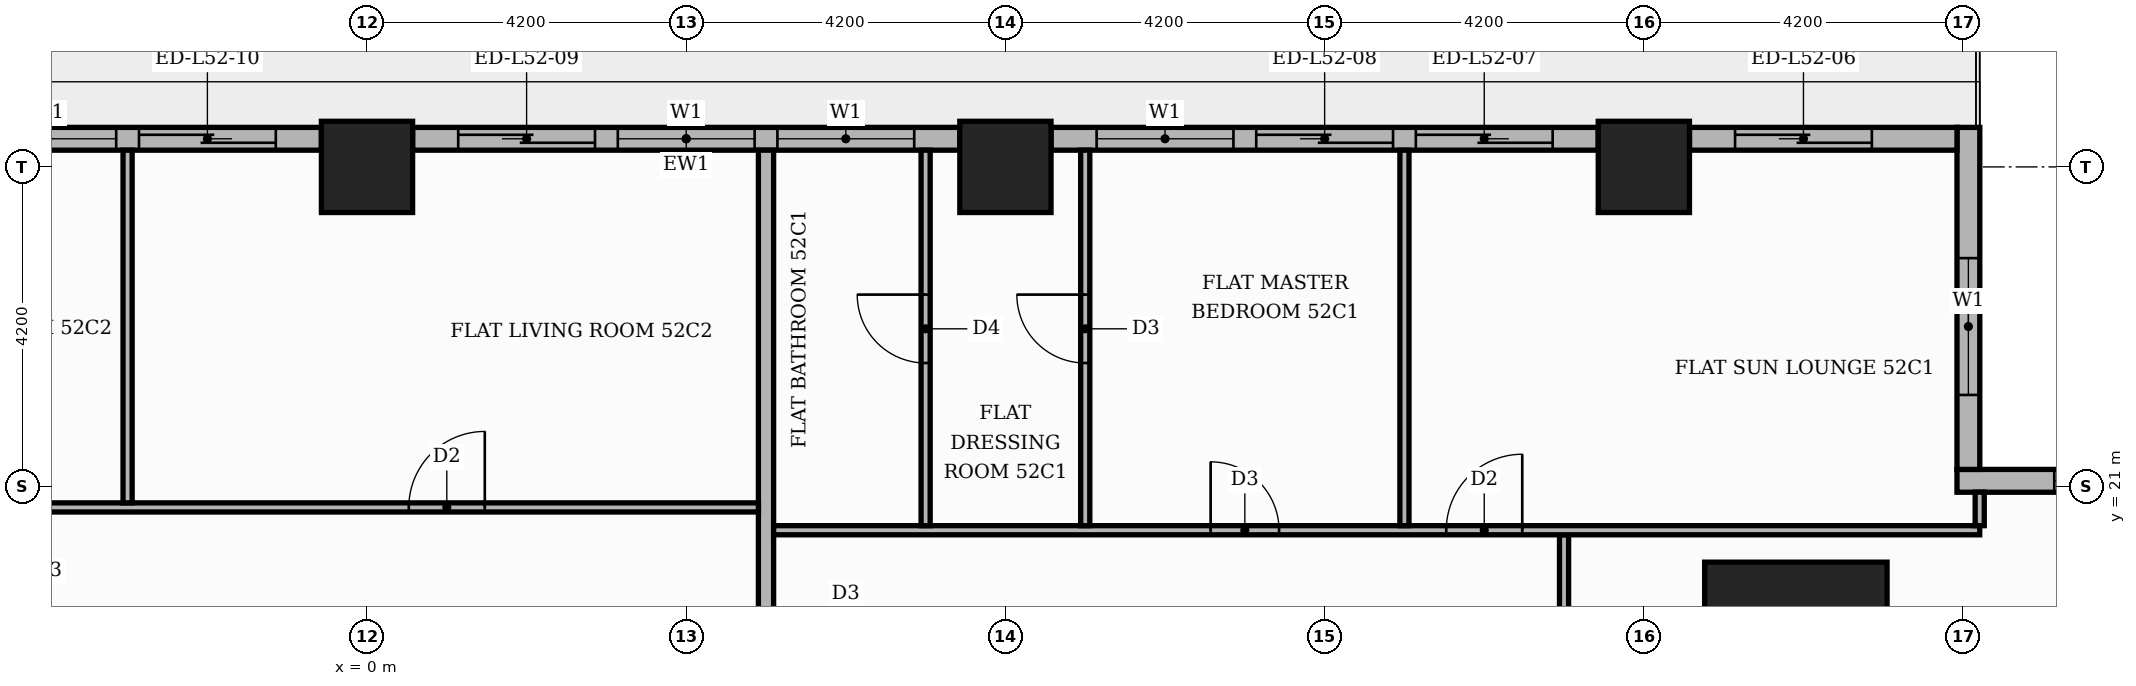
"""IFC4 building model, lengths in metres.
Left out: names, types, materials, properties, quantities, classifications, styles, units other than length and angle.
Written with IfcOpenShell. Run it as: python <this file> out.ifc"""

import sys

from ifc_helpers import new_model, si_unit, direction, frame, frame_2d, origin, origin_2d, place, context, subcontext, project, spatial, rectangle, extrude, element, fill, save


model = new_model("IFC4")
c1 = context("Model", 3, precision=1e-05, world=origin(), true_north=direction((0.0, 1.0)))
c2 = subcontext(c1, "Body", "Model", "MODEL_VIEW")
j1 = project(units=[si_unit("LENGTHUNIT", "METRE"), si_unit("PLANEANGLEUNIT", "RADIAN")], contexts=[c1])
p1 = place(None, origin())
s1 = spatial("IfcSite", under=j1, at=p1, CompositionType="ELEMENT")
p2 = place(p1, origin())
s2 = spatial("IfcBuilding", under=s1, at=p2, CompositionType="ELEMENT")
p3 = place(p2, frame((0.0, 0.0, 219.6)))
s3 = spatial("IfcBuildingStorey", under=s2, at=p3, CompositionType="ELEMENT", Elevation=219.6)
p4 = place(p3, frame((18.8, 18.8, 0.0), z_axis=(0.0, 0.0, 1.0), x_axis=(1.0, 0.0, 0.0)))
e1 = element("IfcColumn", 1, at=p4, inside=s3, PredefinedType="COLUMN", context=c2, shape_type="SweptSolid", body=[
    extrude(rectangle(XDim=2.4, YDim=2.4, at=origin_2d()), origin(), (0.0, 0.0, 1.0), 3.9),
])
for number, where, z_axis, x_axis in (
    (2, (0.0, 25.2, 0.0), (0.0, 0.0, 1.0), (1.0, 0.0, 0.0)),
    (3, (8.4, 25.2, 0.0), (0.0, 0.0, 1.0), (1.0, 0.0, 0.0)),
    (4, (16.8, 25.2, 0.0), (0.0, 0.0, 1.0), (1.0, 0.0, 0.0)),
):
    element("IfcColumn", number, at=place(p3, frame(where, z_axis=z_axis, x_axis=x_axis)), inside=s3, PredefinedType="COLUMN", context=c2, shape_type="SweptSolid", body=[
        extrude(rectangle(XDim=1.2, YDim=1.2, at=origin_2d()), origin(), (0.0, 0.0, 1.0), 3.9),
    ])
p5 = place(p3, frame((25.42, 21.07, 0.0), z_axis=(0.0, 0.0, 1.0), x_axis=(-1.0, 0.0, 0.0)))
e5 = element("IfcWall", 5, at=p5, inside=s3, PredefinedType="STANDARD", context=c2, shape_type="SweptSolid", body=[
    extrude(rectangle(XDim=4.5, YDim=0.3, at=frame_2d((2.25, 0.0))), origin(), (0.0, 0.0, 1.0), 3.48),
])
p6 = place(p5, frame((1.42, 0.0, 0.9)))
e6 = element("IfcOpeningElement", 6, at=p6, cuts=e5, PredefinedType="OPENING", context=c2, shape_type="SweptSolid", body=[
    extrude(rectangle(XDim=1.8, YDim=2.1, at=frame_2d((0.9, 1.05))), frame((0.0, 0.16, 0.0), z_axis=(0.0, -1.0, 0.0), x_axis=(1.0, 0.0, 0.0)), (0.0, 0.0, 1.0), 0.32),
])
p7 = place(p3, frame((21.07, 21.22, 0.0), z_axis=(0.0, 0.0, 1.0), x_axis=(0.0, 1.0, 0.0)))
e7 = element("IfcWall", 7, at=p7, inside=s3, PredefinedType="STANDARD", context=c2, shape_type="SweptSolid", body=[
    extrude(rectangle(XDim=4.5, YDim=0.3, at=frame_2d((2.25, 0.0))), origin(), (0.0, 0.0, 1.0), 3.48),
])
p8 = place(p7, frame((0.98, 0.0, 0.9)))
e8 = element("IfcOpeningElement", 8, at=p8, cuts=e7, PredefinedType="OPENING", context=c2, shape_type="SweptSolid", body=[
    extrude(rectangle(XDim=1.8, YDim=2.1, at=frame_2d((0.9, 1.05))), frame((0.0, 0.16, 0.0), z_axis=(0.0, -1.0, 0.0), x_axis=(1.0, 0.0, 0.0)), (0.0, 0.0, 1.0), 0.32),
])
p9 = place(p3, frame((20.92, 25.57, 0.0), z_axis=(0.0, 0.0, 1.0), x_axis=(-1.0, 0.0, 0.0)))
e9 = element("IfcWall", 9, at=p9, inside=s3, PredefinedType="STANDARD", context=c2, shape_type="SweptSolid", body=[
    extrude(rectangle(XDim=3.52, YDim=0.3, at=frame_2d((1.76, 0.0))), origin(), (0.0, 0.0, 1.0), 3.48),
])
p10 = place(p9, frame((1.12, 0.0, 0.0)))
e10 = element("IfcOpeningElement", 10, at=p10, cuts=e9, PredefinedType="OPENING", context=c2, shape_type="SweptSolid", body=[
    extrude(rectangle(XDim=1.8, YDim=2.4, at=frame_2d((0.9, 1.2))), frame((0.0, 0.16, 0.0), z_axis=(0.0, -1.0, 0.0), x_axis=(1.0, 0.0, 0.0)), (0.0, 0.0, 1.0), 0.32),
])
p11 = place(p3, frame((16.2, 25.57, 0.0), z_axis=(0.0, 0.0, 1.0), x_axis=(-1.0, 0.0, 0.0)))
e11 = element("IfcWall", 11, at=p11, inside=s3, PredefinedType="STANDARD", context=c2, shape_type="SweptSolid", body=[
    extrude(rectangle(XDim=7.2, YDim=0.3, at=frame_2d((3.6, 0.0))), origin(), (0.0, 0.0, 1.0), 3.48),
])
p12 = place(p11, frame((0.6, 0.0, 0.0)))
e12 = element("IfcOpeningElement", 12, at=p12, cuts=e11, PredefinedType="OPENING", context=c2, shape_type="SweptSolid", body=[
    extrude(rectangle(XDim=1.8, YDim=2.4, at=frame_2d((0.9, 1.2))), frame((0.0, 0.16, 0.0), z_axis=(0.0, -1.0, 0.0), x_axis=(1.0, 0.0, 0.0)), (0.0, 0.0, 1.0), 0.32),
])
p13 = place(p11, frame((2.7, 0.0, 0.0)))
e13 = element("IfcOpeningElement", 13, at=p13, cuts=e11, PredefinedType="OPENING", context=c2, shape_type="SweptSolid", body=[
    extrude(rectangle(XDim=1.8, YDim=2.4, at=frame_2d((0.9, 1.2))), frame((0.0, 0.16, 0.0), z_axis=(0.0, -1.0, 0.0), x_axis=(1.0, 0.0, 0.0)), (0.0, 0.0, 1.0), 0.32),
])
p14 = place(p11, frame((4.8, 0.0, 0.9)))
e14 = element("IfcOpeningElement", 14, at=p14, cuts=e11, PredefinedType="OPENING", context=c2, shape_type="SweptSolid", body=[
    extrude(rectangle(XDim=1.8, YDim=2.1, at=frame_2d((0.9, 1.05))), frame((0.0, 0.16, 0.0), z_axis=(0.0, -1.0, 0.0), x_axis=(1.0, 0.0, 0.0)), (0.0, 0.0, 1.0), 0.32),
])
p15 = place(p3, frame((7.8, 25.57, 0.0), z_axis=(0.0, 0.0, 1.0), x_axis=(-1.0, 0.0, 0.0)))
e15 = element("IfcWall", 15, at=p15, inside=s3, PredefinedType="STANDARD", context=c2, shape_type="SweptSolid", body=[
    extrude(rectangle(XDim=7.2, YDim=0.3, at=frame_2d((3.6, 0.0))), origin(), (0.0, 0.0, 1.0), 3.48),
])
p16 = place(p15, frame((0.6, 0.0, 0.9)))
e16 = element("IfcOpeningElement", 16, at=p16, cuts=e15, PredefinedType="OPENING", context=c2, shape_type="SweptSolid", body=[
    extrude(rectangle(XDim=1.8, YDim=2.1, at=frame_2d((0.9, 1.05))), frame((0.0, 0.16, 0.0), z_axis=(0.0, -1.0, 0.0), x_axis=(1.0, 0.0, 0.0)), (0.0, 0.0, 1.0), 0.32),
])
p17 = place(p15, frame((2.7, 0.0, 0.9)))
e17 = element("IfcOpeningElement", 17, at=p17, cuts=e15, PredefinedType="OPENING", context=c2, shape_type="SweptSolid", body=[
    extrude(rectangle(XDim=1.8, YDim=2.1, at=frame_2d((0.9, 1.05))), frame((0.0, 0.16, 0.0), z_axis=(0.0, -1.0, 0.0), x_axis=(1.0, 0.0, 0.0)), (0.0, 0.0, 1.0), 0.32),
])
p18 = place(p15, frame((4.8, 0.0, 0.0)))
e18 = element("IfcOpeningElement", 18, at=p18, cuts=e15, PredefinedType="OPENING", context=c2, shape_type="SweptSolid", body=[
    extrude(rectangle(XDim=1.8, YDim=2.4, at=frame_2d((0.9, 1.2))), frame((0.0, 0.16, 0.0), z_axis=(0.0, -1.0, 0.0), x_axis=(1.0, 0.0, 0.0)), (0.0, 0.0, 1.0), 0.32),
])
p19 = place(p3, frame((-0.6, 25.57, 0.0), z_axis=(0.0, 0.0, 1.0), x_axis=(-1.0, 0.0, 0.0)))
e19 = element("IfcWall", 19, at=p19, inside=s3, PredefinedType="STANDARD", context=c2, shape_type="SweptSolid", body=[
    extrude(rectangle(XDim=7.2, YDim=0.3, at=frame_2d((3.6, 0.0))), origin(), (0.0, 0.0, 1.0), 3.48),
])
p20 = place(p19, frame((0.6, 0.0, 0.0)))
e20 = element("IfcOpeningElement", 20, at=p20, cuts=e19, PredefinedType="OPENING", context=c2, shape_type="SweptSolid", body=[
    extrude(rectangle(XDim=1.8, YDim=2.4, at=frame_2d((0.9, 1.2))), frame((0.0, 0.16, 0.0), z_axis=(0.0, -1.0, 0.0), x_axis=(1.0, 0.0, 0.0)), (0.0, 0.0, 1.0), 0.32),
])
p21 = place(p19, frame((2.7, 0.0, 0.9)))
e21 = element("IfcOpeningElement", 21, at=p21, cuts=e19, PredefinedType="OPENING", context=c2, shape_type="SweptSolid", body=[
    extrude(rectangle(XDim=1.8, YDim=2.1, at=frame_2d((0.9, 1.05))), frame((0.0, 0.16, 0.0), z_axis=(0.0, -1.0, 0.0), x_axis=(1.0, 0.0, 0.0)), (0.0, 0.0, 1.0), 0.32),
])
p22 = place(p19, frame((4.8, 0.0, 0.0)))
e22 = element("IfcOpeningElement", 22, at=p22, cuts=e19, PredefinedType="OPENING", context=c2, shape_type="SweptSolid", body=[
    extrude(rectangle(XDim=1.8, YDim=2.4, at=frame_2d((0.9, 1.2))), frame((0.0, 0.16, 0.0), z_axis=(0.0, -1.0, 0.0), x_axis=(1.0, 0.0, 0.0)), (0.0, 0.0, 1.0), 0.32),
])
p23 = place(p3, frame((5.25, 13.75, 0.0), z_axis=(0.0, 0.0, 1.0), x_axis=(0.0, 1.0, 0.0)))
e23 = element("IfcWall", 23, at=p23, inside=s3, PredefinedType="PARTITIONING", context=c2, shape_type="SweptSolid", body=[
    extrude(rectangle(XDim=11.67, YDim=0.2, at=frame_2d((5.835, 0.0))), origin(), (0.0, 0.0, 1.0), 3.48),
])
p24 = place(p3, frame((15.75, 13.75, 0.0), z_axis=(0.0, 0.0, 1.0), x_axis=(0.0, 1.0, 0.0)))
e24 = element("IfcWall", 24, at=p24, inside=s3, PredefinedType="PARTITIONING", context=c2, shape_type="SweptSolid", body=[
    extrude(rectangle(XDim=6.61, YDim=0.12, at=frame_2d((3.305, 0.0))), origin(), (0.0, 0.0, 1.0), 3.48),
])
p25 = place(p24, frame((2.785, 0.0, 0.0)))
e25 = element("IfcOpeningElement", 25, at=p25, cuts=e24, PredefinedType="OPENING", context=c2, shape_type="SweptSolid", body=[
    extrude(rectangle(XDim=1.0, YDim=2.1, at=frame_2d((0.5, 1.05))), frame((0.0, 0.07, 0.0), z_axis=(0.0, -1.0, 0.0), x_axis=(1.0, 0.0, 0.0)), (0.0, 0.0, 1.0), 0.14),
])
p26 = place(p3, frame((5.35, 20.42, 0.0), z_axis=(0.0, 0.0, 1.0), x_axis=(1.0, 0.0, 0.0)))
e26 = element("IfcWall", 26, at=p26, inside=s3, PredefinedType="PARTITIONING", context=c2, shape_type="SweptSolid", body=[
    extrude(rectangle(XDim=15.869, YDim=0.12, at=frame_2d((7.935, 0.0))), origin(), (0.0, 0.0, 1.0), 3.48),
])
p27 = place(p26, frame((8.85, 0.0, 0.0)))
e27 = element("IfcOpeningElement", 27, at=p27, cuts=e26, PredefinedType="OPENING", context=c2, shape_type="SweptSolid", body=[
    extrude(rectangle(XDim=1.0, YDim=2.1, at=frame_2d((0.5, 1.05))), frame((0.0, 0.07, 0.0), z_axis=(0.0, -1.0, 0.0), x_axis=(1.0, 0.0, 0.0)), (0.0, 0.0, 1.0), 0.14),
])
p28 = place(p26, frame((5.75, 0.0, 0.0)))
e28 = element("IfcOpeningElement", 28, at=p28, cuts=e26, PredefinedType="OPENING", context=c2, shape_type="SweptSolid", body=[
    extrude(rectangle(XDim=0.9, YDim=2.1, at=frame_2d((0.45, 1.05))), frame((0.0, 0.07, 0.0), z_axis=(0.0, -1.0, 0.0), x_axis=(1.0, 0.0, 0.0)), (0.0, 0.0, 1.0), 0.14),
])
p29 = place(p3, frame((7.35, 20.48, 0.0), z_axis=(0.0, 0.0, 1.0), x_axis=(0.0, 1.0, 0.0)))
e29 = element("IfcWall", 29, at=p29, inside=s3, PredefinedType="PARTITIONING", context=c2, shape_type="SweptSolid", body=[
    extrude(rectangle(XDim=4.94, YDim=0.12, at=frame_2d((2.47, 0.0))), origin(), (0.0, 0.0, 1.0), 3.48),
])
p30 = place(p29, frame((2.14, 0.0, 0.0)))
e30 = element("IfcOpeningElement", 30, at=p30, cuts=e29, PredefinedType="OPENING", context=c2, shape_type="SweptSolid", body=[
    extrude(rectangle(XDim=0.9, YDim=2.1, at=frame_2d((0.45, 1.05))), frame((0.0, 0.07, 0.0), z_axis=(0.0, -1.0, 0.0), x_axis=(1.0, 0.0, 0.0)), (0.0, 0.0, 1.0), 0.14),
])
p31 = place(p3, frame((9.45, 20.48, 0.0), z_axis=(0.0, 0.0, 1.0), x_axis=(0.0, 1.0, 0.0)))
e31 = element("IfcWall", 31, at=p31, inside=s3, PredefinedType="PARTITIONING", context=c2, shape_type="SweptSolid", body=[
    extrude(rectangle(XDim=4.94, YDim=0.12, at=frame_2d((2.47, 0.0))), origin(), (0.0, 0.0, 1.0), 3.48),
])
p32 = place(p31, frame((2.14, 0.0, 0.0)))
e32 = element("IfcOpeningElement", 32, at=p32, cuts=e31, PredefinedType="OPENING", context=c2, shape_type="SweptSolid", body=[
    extrude(rectangle(XDim=0.9, YDim=2.1, at=frame_2d((0.45, 1.05))), frame((0.0, 0.07, 0.0), z_axis=(0.0, -1.0, 0.0), x_axis=(1.0, 0.0, 0.0)), (0.0, 0.0, 1.0), 0.14),
])
p33 = place(p3, frame((13.65, 20.48, 0.0), z_axis=(0.0, 0.0, 1.0), x_axis=(0.0, 1.0, 0.0)))
e33 = element("IfcWall", 33, at=p33, inside=s3, PredefinedType="PARTITIONING", context=c2, shape_type="SweptSolid", body=[
    extrude(rectangle(XDim=4.94, YDim=0.12, at=frame_2d((2.47, 0.0))), origin(), (0.0, 0.0, 1.0), 3.48),
])
p34 = place(p3, frame((21.219, 20.48, 0.0), z_axis=(0.0, 0.0, 1.0), x_axis=(0.0, 1.0, 0.0)))
e34 = element("IfcWall", 34, at=p34, inside=s3, PredefinedType="PARTITIONING", context=c2, shape_type="SweptSolid", body=[
    extrude(rectangle(XDim=0.441, YDim=0.12, at=frame_2d((0.22, 0.0))), origin(), (0.0, 0.0, 1.0), 3.48),
])
p35 = place(p3, frame((-13.55, 20.72, 0.0), z_axis=(0.0, 0.0, 1.0), x_axis=(1.0, 0.0, 0.0)))
e35 = element("IfcWall", 35, at=p35, inside=s3, PredefinedType="PARTITIONING", context=c2, shape_type="SweptSolid", body=[
    extrude(rectangle(XDim=18.7, YDim=0.12, at=frame_2d((9.35, 0.0))), origin(), (0.0, 0.0, 1.0), 3.48),
])
p36 = place(p35, frame((14.1, 0.0, 0.0)))
e36 = element("IfcOpeningElement", 36, at=p36, cuts=e35, PredefinedType="OPENING", context=c2, shape_type="SweptSolid", body=[
    extrude(rectangle(XDim=1.0, YDim=2.1, at=frame_2d((0.5, 1.05))), frame((0.0, 0.07, 0.0), z_axis=(0.0, -1.0, 0.0), x_axis=(1.0, 0.0, 0.0)), (0.0, 0.0, 1.0), 0.14),
])
p37 = place(p35, frame((6.8, 0.0, 0.0)))
e37 = element("IfcOpeningElement", 37, at=p37, cuts=e35, PredefinedType="OPENING", context=c2, shape_type="SweptSolid", body=[
    extrude(rectangle(XDim=0.9, YDim=2.1, at=frame_2d((0.45, 1.05))), frame((0.0, 0.07, 0.0), z_axis=(0.0, -1.0, 0.0), x_axis=(1.0, 0.0, 0.0)), (0.0, 0.0, 1.0), 0.14),
])
p38 = place(p3, frame((-3.15, 20.78, 0.0), z_axis=(0.0, 0.0, 1.0), x_axis=(0.0, 1.0, 0.0)))
e38 = element("IfcWall", 38, at=p38, inside=s3, PredefinedType="PARTITIONING", context=c2, shape_type="SweptSolid", body=[
    extrude(rectangle(XDim=4.64, YDim=0.12, at=frame_2d((2.32, 0.0))), origin(), (0.0, 0.0, 1.0), 3.48),
])
p39 = place(p6, origin())
e39 = element("IfcWindow", 39, at=p39, inside=s3, PartitioningType="SINGLE_PANEL", PredefinedType="WINDOW", context=c2, shape_type="SweptSolid", body=[
    extrude(rectangle(XDim=1.8, YDim=2.1, at=frame_2d((0.9, 1.05))), frame((0.0, 0.03, 0.0), z_axis=(0.0, -1.0, 0.0), x_axis=(1.0, 0.0, 0.0)), (0.0, 0.0, 1.0), 0.06),
])
fill(e6, e39)
p40 = place(p8, origin())
e40 = element("IfcWindow", 40, at=p40, inside=s3, PartitioningType="SINGLE_PANEL", PredefinedType="WINDOW", context=c2, shape_type="SweptSolid", body=[
    extrude(rectangle(XDim=1.8, YDim=2.1, at=frame_2d((0.9, 1.05))), frame((0.0, 0.03, 0.0), z_axis=(0.0, -1.0, 0.0), x_axis=(1.0, 0.0, 0.0)), (0.0, 0.0, 1.0), 0.06),
])
fill(e8, e40)
p41 = place(p10, origin())
e41 = element("IfcDoor", 41, at=p41, inside=s3, OperationType="SLIDING_TO_RIGHT", PredefinedType="DOOR", context=c2, shape_type="SweptSolid", body=[
    extrude(rectangle(XDim=1.8, YDim=2.4, at=frame_2d((0.9, 1.2))), frame((0.0, 0.025, 0.0), z_axis=(0.0, -1.0, 0.0), x_axis=(1.0, 0.0, 0.0)), (0.0, 0.0, 1.0), 0.05),
])
fill(e10, e41)
p42 = place(p12, origin())
e42 = element("IfcDoor", 42, at=p42, inside=s3, OperationType="SLIDING_TO_LEFT", PredefinedType="DOOR", context=c2, shape_type="SweptSolid", body=[
    extrude(rectangle(XDim=1.8, YDim=2.4, at=frame_2d((0.9, 1.2))), frame((0.0, 0.025, 0.0), z_axis=(0.0, -1.0, 0.0), x_axis=(1.0, 0.0, 0.0)), (0.0, 0.0, 1.0), 0.05),
])
fill(e12, e42)
p43 = place(p13, origin())
e43 = element("IfcDoor", 43, at=p43, inside=s3, OperationType="SLIDING_TO_RIGHT", PredefinedType="DOOR", context=c2, shape_type="SweptSolid", body=[
    extrude(rectangle(XDim=1.8, YDim=2.4, at=frame_2d((0.9, 1.2))), frame((0.0, 0.025, 0.0), z_axis=(0.0, -1.0, 0.0), x_axis=(1.0, 0.0, 0.0)), (0.0, 0.0, 1.0), 0.05),
])
fill(e13, e43)
p44 = place(p14, origin())
e44 = element("IfcWindow", 44, at=p44, inside=s3, PartitioningType="SINGLE_PANEL", PredefinedType="WINDOW", context=c2, shape_type="SweptSolid", body=[
    extrude(rectangle(XDim=1.8, YDim=2.1, at=frame_2d((0.9, 1.05))), frame((0.0, 0.03, 0.0), z_axis=(0.0, -1.0, 0.0), x_axis=(1.0, 0.0, 0.0)), (0.0, 0.0, 1.0), 0.06),
])
fill(e14, e44)
p45 = place(p16, origin())
e45 = element("IfcWindow", 45, at=p45, inside=s3, PartitioningType="SINGLE_PANEL", PredefinedType="WINDOW", context=c2, shape_type="SweptSolid", body=[
    extrude(rectangle(XDim=1.8, YDim=2.1, at=frame_2d((0.9, 1.05))), frame((0.0, 0.03, 0.0), z_axis=(0.0, -1.0, 0.0), x_axis=(1.0, 0.0, 0.0)), (0.0, 0.0, 1.0), 0.06),
])
fill(e16, e45)
p46 = place(p17, origin())
e46 = element("IfcWindow", 46, at=p46, inside=s3, PartitioningType="SINGLE_PANEL", PredefinedType="WINDOW", context=c2, shape_type="SweptSolid", body=[
    extrude(rectangle(XDim=1.8, YDim=2.1, at=frame_2d((0.9, 1.05))), frame((0.0, 0.03, 0.0), z_axis=(0.0, -1.0, 0.0), x_axis=(1.0, 0.0, 0.0)), (0.0, 0.0, 1.0), 0.06),
])
fill(e17, e46)
p47 = place(p18, origin())
e47 = element("IfcDoor", 47, at=p47, inside=s3, OperationType="SLIDING_TO_RIGHT", PredefinedType="DOOR", context=c2, shape_type="SweptSolid", body=[
    extrude(rectangle(XDim=1.8, YDim=2.4, at=frame_2d((0.9, 1.2))), frame((0.0, 0.025, 0.0), z_axis=(0.0, -1.0, 0.0), x_axis=(1.0, 0.0, 0.0)), (0.0, 0.0, 1.0), 0.05),
])
fill(e18, e47)
p48 = place(p20, origin())
e48 = element("IfcDoor", 48, at=p48, inside=s3, OperationType="SLIDING_TO_LEFT", PredefinedType="DOOR", context=c2, shape_type="SweptSolid", body=[
    extrude(rectangle(XDim=1.8, YDim=2.4, at=frame_2d((0.9, 1.2))), frame((0.0, 0.025, 0.0), z_axis=(0.0, -1.0, 0.0), x_axis=(1.0, 0.0, 0.0)), (0.0, 0.0, 1.0), 0.05),
])
fill(e20, e48)
p49 = place(p21, origin())
e49 = element("IfcWindow", 49, at=p49, inside=s3, PartitioningType="SINGLE_PANEL", PredefinedType="WINDOW", context=c2, shape_type="SweptSolid", body=[
    extrude(rectangle(XDim=1.8, YDim=2.1, at=frame_2d((0.9, 1.05))), frame((0.0, 0.03, 0.0), z_axis=(0.0, -1.0, 0.0), x_axis=(1.0, 0.0, 0.0)), (0.0, 0.0, 1.0), 0.06),
])
fill(e21, e49)
p50 = place(p27, origin())
e50 = element("IfcDoor", 50, at=p50, inside=s3, OperationType="SINGLE_SWING_RIGHT", PredefinedType="DOOR", context=c2, shape_type="SweptSolid", body=[
    extrude(rectangle(XDim=1.0, YDim=2.1, at=frame_2d((0.5, 1.05))), frame((0.0, 0.025, 0.0), z_axis=(0.0, -1.0, 0.0), x_axis=(1.0, 0.0, 0.0)), (0.0, 0.0, 1.0), 0.05),
])
fill(e27, e50)
p51 = place(p28, origin())
e51 = element("IfcDoor", 51, at=p51, inside=s3, OperationType="SINGLE_SWING_LEFT", PredefinedType="DOOR", context=c2, shape_type="SweptSolid", body=[
    extrude(rectangle(XDim=0.9, YDim=2.1, at=frame_2d((0.45, 1.05))), frame((0.0, 0.025, 0.0), z_axis=(0.0, -1.0, 0.0), x_axis=(1.0, 0.0, 0.0)), (0.0, 0.0, 1.0), 0.05),
])
fill(e28, e51)
p52 = place(p32, origin())
e52 = element("IfcDoor", 52, at=p52, inside=s3, OperationType="SINGLE_SWING_RIGHT", PredefinedType="DOOR", context=c2, shape_type="SweptSolid", body=[
    extrude(rectangle(XDim=0.9, YDim=2.1, at=frame_2d((0.45, 1.05))), frame((0.0, 0.025, 0.0), z_axis=(0.0, -1.0, 0.0), x_axis=(1.0, 0.0, 0.0)), (0.0, 0.0, 1.0), 0.05),
])
fill(e32, e52)
p53 = place(p30, origin())
e53 = element("IfcDoor", 53, at=p53, inside=s3, OperationType="SINGLE_SWING_RIGHT", PredefinedType="DOOR", context=c2, shape_type="SweptSolid", body=[
    extrude(rectangle(XDim=0.9, YDim=2.1, at=frame_2d((0.45, 1.05))), frame((0.0, 0.025, 0.0), z_axis=(0.0, -1.0, 0.0), x_axis=(1.0, 0.0, 0.0)), (0.0, 0.0, 1.0), 0.05),
])
fill(e30, e53)
p54 = place(p36, origin())
e54 = element("IfcDoor", 54, at=p54, inside=s3, OperationType="SINGLE_SWING_RIGHT", PredefinedType="DOOR", context=c2, shape_type="SweptSolid", body=[
    extrude(rectangle(XDim=1.0, YDim=2.1, at=frame_2d((0.5, 1.05))), frame((0.0, 0.025, 0.0), z_axis=(0.0, -1.0, 0.0), x_axis=(1.0, 0.0, 0.0)), (0.0, 0.0, 1.0), 0.05),
])
fill(e36, e54)
save(model, sys.argv[1])
